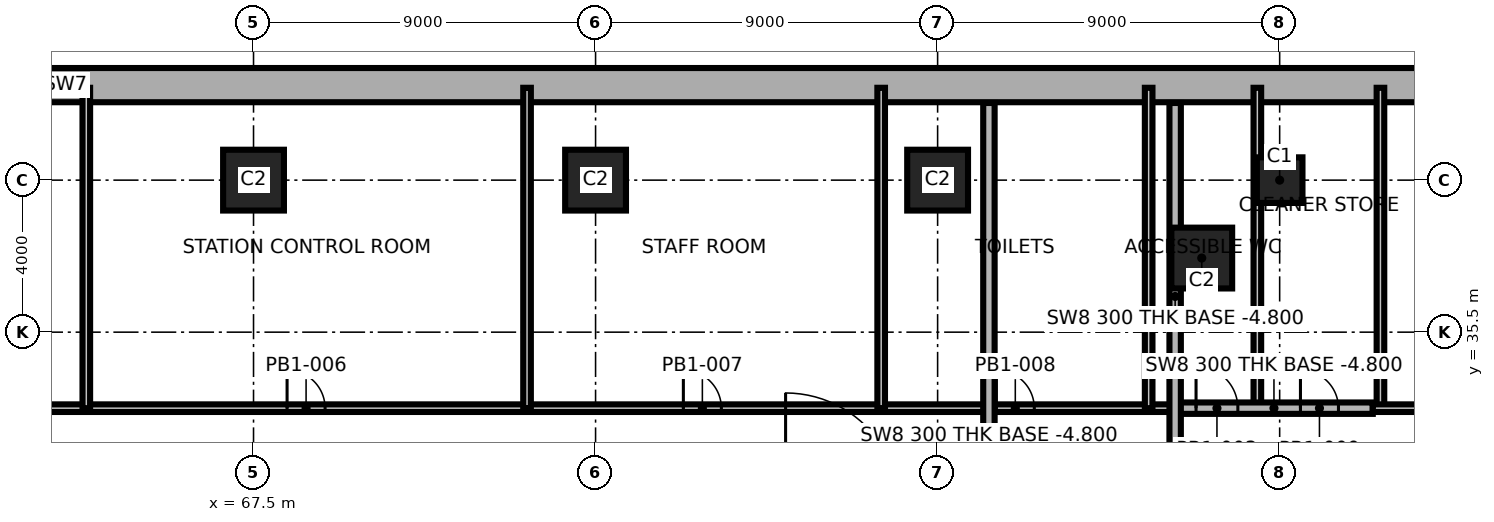
"""IFC4 building model, lengths in metres.
Left out: names, types, materials, properties, quantities, classifications, styles, units other than length and angle.
Written with IfcOpenShell. Run it as: python <this file> out.ifc"""

import sys

from ifc_helpers import new_model, si_unit, direction, frame, frame_2d, origin, origin_2d, place, context, subcontext, project, spatial, rectangle, extrude, element, fill, save


model = new_model("IFC4")
c1 = context("Model", 3, precision=1e-05, world=origin(), true_north=direction((0.0, 1.0)))
c2 = subcontext(c1, "Body", "Model", "MODEL_VIEW")
j1 = project(units=[si_unit("LENGTHUNIT", "METRE"), si_unit("PLANEANGLEUNIT", "RADIAN")], contexts=[c1])
p1 = place(None, origin())
s1 = spatial("IfcSite", under=j1, at=p1, CompositionType="ELEMENT")
p2 = place(p1, origin())
s2 = spatial("IfcBuilding", under=s1, at=p2, CompositionType="ELEMENT")
p3 = place(p2, frame((0.0, 0.0, -4.5)))
s3 = spatial("IfcBuildingStorey", under=s2, at=p3, CompositionType="ELEMENT", Elevation=-4.5)
for number, where, z_axis, x_axis in (
    (1, (67.5, 39.5, 0.0), (0.0, 0.0, 1.0), (1.0, 0.0, 0.0)),
    (2, (76.5, 39.5, 0.0), (0.0, 0.0, 1.0), (1.0, 0.0, 0.0)),
    (3, (85.5, 39.5, 0.0), (0.0, 0.0, 1.0), (1.0, 0.0, 0.0)),
):
    element("IfcColumn", number, at=place(p3, frame(where, z_axis=z_axis, x_axis=x_axis)), inside=s3, PredefinedType="COLUMN", context=c2, shape_type="SweptSolid", body=[
        extrude(rectangle(XDim=1.6, YDim=1.6, at=origin_2d()), origin(), (0.0, 0.0, 1.0), 4.5),
    ])
p4 = place(p3, frame((94.5, 39.5, 0.0), z_axis=(0.0, 0.0, 1.0), x_axis=(1.0, 0.0, 0.0)))
e4 = element("IfcColumn", 4, at=p4, inside=s3, PredefinedType="COLUMN", context=c2, shape_type="SweptSolid", body=[
    extrude(rectangle(XDim=1.2, YDim=1.2, at=origin_2d()), origin(), (0.0, 0.0, 1.0), 4.5),
])
p5 = place(p3, frame((92.45, 37.45, 0.0), z_axis=(0.0, 0.0, 1.0), x_axis=(1.0, 0.0, 0.0)))
e5 = element("IfcColumn", 5, at=p5, inside=s3, PredefinedType="COLUMN", context=c2, shape_type="SweptSolid", body=[
    extrude(rectangle(XDim=1.6, YDim=1.6, at=origin_2d()), origin(), (0.0, 0.0, 1.0), 4.5),
])
p6 = place(p3, frame((104.55, 42.0, 0.0), z_axis=(0.0, 0.0, 1.0), x_axis=(-1.0, 0.0, 0.0)))
e6 = element("IfcWall", 6, at=p6, inside=s3, PredefinedType="SOLIDWALL", context=c2, shape_type="SweptSolid", body=[
    extrude(rectangle(XDim=84.0, YDim=0.9, at=frame_2d((42.0, 0.0))), origin(), (0.0, 0.0, 1.0), 4.5),
])
p7 = place(p3, frame((61.5, 33.5, 0.0), z_axis=(0.0, 0.0, 1.0), x_axis=(1.0, 0.0, 0.0)))
e7 = element("IfcWall", 7, at=p7, inside=s3, PredefinedType="PARTITIONING", context=c2, shape_type="SweptSolid", body=[
    extrude(rectangle(XDim=30.25, YDim=0.2, at=frame_2d((15.125, 0.0))), origin(), (0.0, 0.0, 1.0), 4.2),
])
p8 = place(p7, frame((6.883, 0.0, 0.0)))
e8 = element("IfcOpeningElement", 8, at=p8, cuts=e7, PredefinedType="OPENING", context=c2, shape_type="SweptSolid", body=[
    extrude(rectangle(XDim=1.0, YDim=2.1, at=frame_2d((0.5, 1.05))), frame((0.0, 0.11, 0.0), z_axis=(0.0, -1.0, 0.0), x_axis=(1.0, 0.0, 0.0)), (0.0, 0.0, 1.0), 0.22),
])
p9 = place(p7, frame((17.31, 0.0, 0.0)))
e9 = element("IfcOpeningElement", 9, at=p9, cuts=e7, PredefinedType="OPENING", context=c2, shape_type="SweptSolid", body=[
    extrude(rectangle(XDim=1.0, YDim=2.1, at=frame_2d((0.5, 1.05))), frame((0.0, 0.11, 0.0), z_axis=(0.0, -1.0, 0.0), x_axis=(1.0, 0.0, 0.0)), (0.0, 0.0, 1.0), 0.22),
])
p10 = place(p7, frame((25.544, 0.0, 0.0)))
e10 = element("IfcOpeningElement", 10, at=p10, cuts=e7, PredefinedType="OPENING", context=c2, shape_type="SweptSolid", body=[
    extrude(rectangle(XDim=1.0, YDim=2.1, at=frame_2d((0.5, 1.05))), frame((0.0, 0.11, 0.0), z_axis=(0.0, -1.0, 0.0), x_axis=(1.0, 0.0, 0.0)), (0.0, 0.0, 1.0), 0.22),
])
for number, where, z_axis, x_axis in (
    (11, (63.1, 33.5, 0.0), (0.0, 0.0, 1.0), (0.0, 1.0, 0.0)),
    (12, (74.697, 33.5, 0.0), (0.0, 0.0, 1.0), (0.0, 1.0, 0.0)),
    (13, (84.015, 33.5, 0.0), (0.0, 0.0, 1.0), (0.0, 1.0, 0.0)),
    (14, (91.053, 33.5, 0.0), (0.0, 0.0, 1.0), (0.0, 1.0, 0.0)),
    (15, (93.913, 33.5, 0.0), (0.0, 0.0, 1.0), (0.0, 1.0, 0.0)),
    (16, (97.152, 33.5, 0.0), (0.0, 0.0, 1.0), (0.0, 1.0, 0.0)),
):
    element("IfcWall", number, at=place(p3, frame(where, z_axis=z_axis, x_axis=x_axis)), inside=s3, PredefinedType="PARTITIONING", context=c2, shape_type="SweptSolid", body=[
        extrude(rectangle(XDim=8.43, YDim=0.2, at=frame_2d((4.215, 0.0))), origin(), (0.0, 0.0, 1.0), 4.2),
    ])
p11 = place(p3, frame((91.75, 33.5, -0.3), z_axis=(0.0, 0.0, 1.0), x_axis=(1.0, 0.0, 0.0)))
e17 = element("IfcWall", 17, at=p11, inside=s3, PredefinedType="SHEAR", context=c2, shape_type="SweptSolid", body=[
    extrude(rectangle(XDim=5.2, YDim=0.3, at=frame_2d((2.6, 0.0))), origin(), (0.0, 0.0, 1.0), 4.5),
])
p12 = place(p11, frame((0.55, 0.0, 0.3)))
e18 = element("IfcOpeningElement", 18, at=p12, cuts=e17, PredefinedType="OPENING", context=c2, shape_type="SweptSolid", body=[
    extrude(rectangle(XDim=1.1, YDim=2.1, at=frame_2d((0.55, 1.05))), frame((0.0, 0.16, 0.0), z_axis=(0.0, -1.0, 0.0), x_axis=(1.0, 0.0, 0.0)), (0.0, 0.0, 1.0), 0.32),
])
p13 = place(p11, frame((3.297, 0.0, 0.3)))
e19 = element("IfcOpeningElement", 19, at=p13, cuts=e17, PredefinedType="OPENING", context=c2, shape_type="SweptSolid", body=[
    extrude(rectangle(XDim=1.0, YDim=2.1, at=frame_2d((0.5, 1.05))), frame((0.0, 0.16, 0.0), z_axis=(0.0, -1.0, 0.0), x_axis=(1.0, 0.0, 0.0)), (0.0, 0.0, 1.0), 0.32),
])
p14 = place(p3, frame((86.85, 21.8, -0.3), z_axis=(0.0, 0.0, 1.0), x_axis=(0.0, 1.0, 0.0)))
e20 = element("IfcWall", 20, at=p14, inside=s3, PredefinedType="SHEAR", context=c2, shape_type="SweptSolid", body=[
    extrude(rectangle(XDim=19.73, YDim=0.3, at=frame_2d((9.865, 0.0))), origin(), (0.0, 0.0, 1.0), 4.5),
])
p15 = place(p3, frame((91.75, 31.35, -0.3), z_axis=(0.0, 0.0, 1.0), x_axis=(0.0, 1.0, 0.0)))
e21 = element("IfcWall", 21, at=p15, inside=s3, PredefinedType="SHEAR", context=c2, shape_type="SweptSolid", body=[
    extrude(rectangle(XDim=10.18, YDim=0.3, at=frame_2d((5.09, 0.0))), origin(), (0.0, 0.0, 1.0), 4.5),
])
p16 = place(p3, frame((96.95, 33.5, 0.0), z_axis=(0.0, 0.0, 1.0), x_axis=(1.0, 0.0, 0.0)))
e22 = element("IfcWall", 22, at=p16, inside=s3, PredefinedType="PARTITIONING", context=c2, shape_type="SweptSolid", body=[
    extrude(rectangle(XDim=7.98, YDim=0.2, at=frame_2d((3.99, 0.0))), origin(), (0.0, 0.0, 1.0), 4.2),
])
p17 = place(p16, frame((3.588, 0.0, 0.0)))
e23 = element("IfcOpeningElement", 23, at=p17, cuts=e22, PredefinedType="OPENING", context=c2, shape_type="SweptSolid", body=[
    extrude(rectangle(XDim=1.0, YDim=2.1, at=frame_2d((0.5, 1.05))), frame((0.0, 0.11, 0.0), z_axis=(0.0, -1.0, 0.0), x_axis=(1.0, 0.0, 0.0)), (0.0, 0.0, 1.0), 0.22),
])
p18 = place(p12, origin())
e24 = element("IfcDoor", 24, at=p18, inside=s3, OperationType="SINGLE_SWING_LEFT", PredefinedType="DOOR", context=c2, shape_type="SweptSolid", body=[
    extrude(rectangle(XDim=1.1, YDim=2.1, at=frame_2d((0.55, 1.05))), frame((0.0, 0.025, 0.0), z_axis=(0.0, -1.0, 0.0), x_axis=(1.0, 0.0, 0.0)), (0.0, 0.0, 1.0), 0.05),
])
fill(e18, e24)
p19 = place(p8, origin())
e25 = element("IfcDoor", 25, at=p19, inside=s3, OperationType="SINGLE_SWING_RIGHT", PredefinedType="DOOR", context=c2, shape_type="SweptSolid", body=[
    extrude(rectangle(XDim=1.0, YDim=2.1, at=frame_2d((0.5, 1.05))), frame((0.0, 0.025, 0.0), z_axis=(0.0, -1.0, 0.0), x_axis=(1.0, 0.0, 0.0)), (0.0, 0.0, 1.0), 0.05),
])
fill(e8, e25)
p20 = place(p9, origin())
e26 = element("IfcDoor", 26, at=p20, inside=s3, OperationType="SINGLE_SWING_LEFT", PredefinedType="DOOR", context=c2, shape_type="SweptSolid", body=[
    extrude(rectangle(XDim=1.0, YDim=2.1, at=frame_2d((0.5, 1.05))), frame((0.0, 0.025, 0.0), z_axis=(0.0, -1.0, 0.0), x_axis=(1.0, 0.0, 0.0)), (0.0, 0.0, 1.0), 0.05),
])
fill(e9, e26)
p21 = place(p10, origin())
e27 = element("IfcDoor", 27, at=p21, inside=s3, OperationType="SINGLE_SWING_RIGHT", PredefinedType="DOOR", context=c2, shape_type="SweptSolid", body=[
    extrude(rectangle(XDim=1.0, YDim=2.1, at=frame_2d((0.5, 1.05))), frame((0.0, 0.025, 0.0), z_axis=(0.0, -1.0, 0.0), x_axis=(1.0, 0.0, 0.0)), (0.0, 0.0, 1.0), 0.05),
])
fill(e10, e27)
p22 = place(p13, origin())
e28 = element("IfcDoor", 28, at=p22, inside=s3, OperationType="SINGLE_SWING_LEFT", PredefinedType="DOOR", context=c2, shape_type="SweptSolid", body=[
    extrude(rectangle(XDim=1.0, YDim=2.1, at=frame_2d((0.5, 1.05))), frame((0.0, 0.025, 0.0), z_axis=(0.0, -1.0, 0.0), x_axis=(1.0, 0.0, 0.0)), (0.0, 0.0, 1.0), 0.05),
])
fill(e19, e28)
save(model, sys.argv[1])
